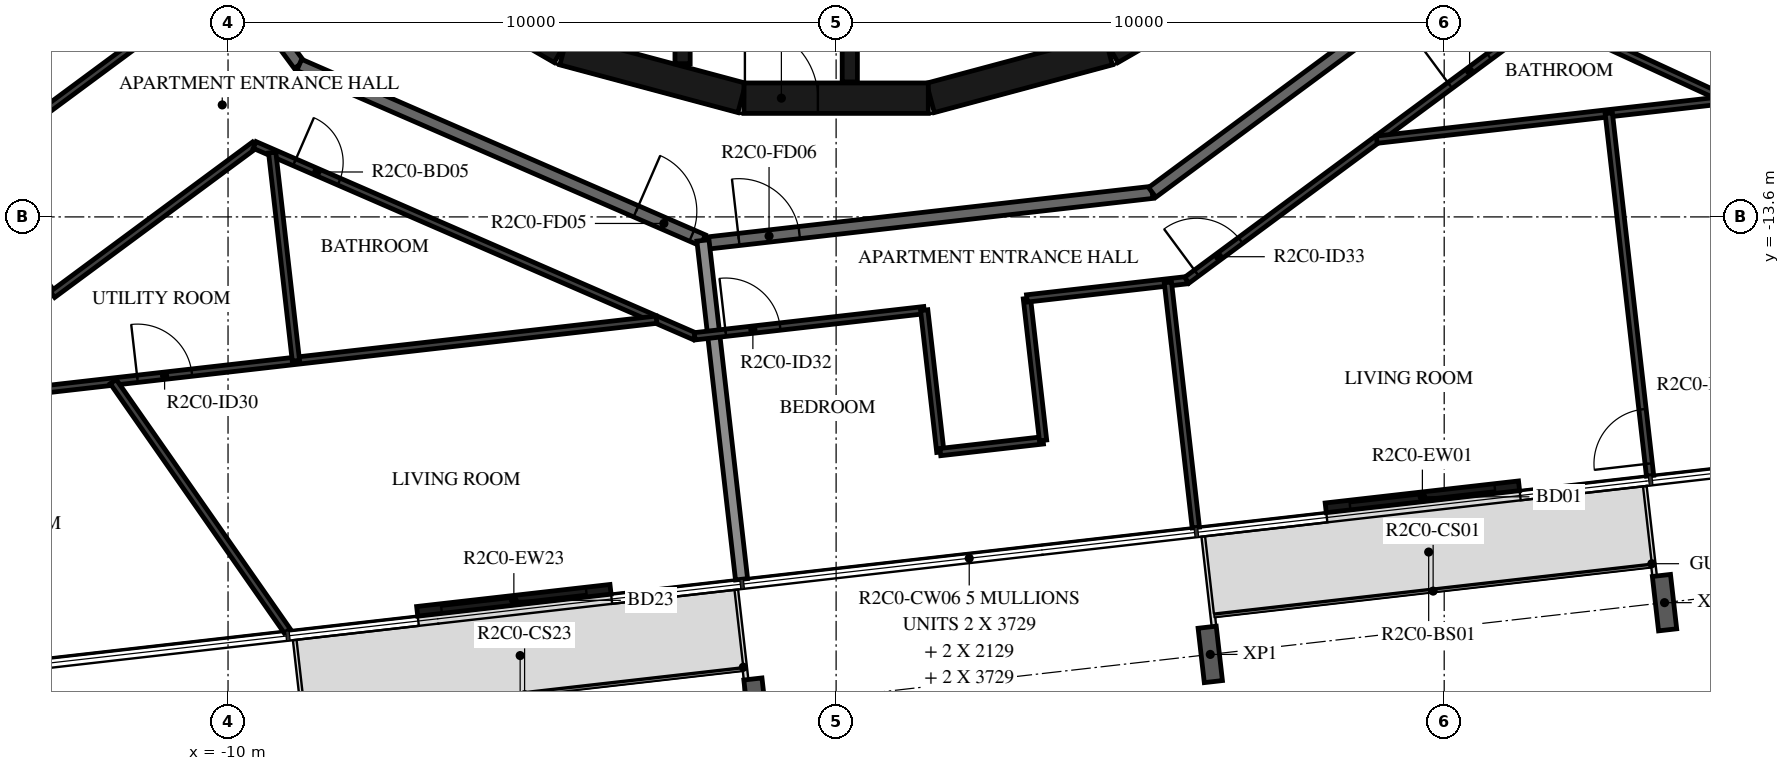
"""IFC4 building model, lengths in metres.
Left out: names, types, materials, properties, quantities, classifications, styles, units other than length and angle.
Written with IfcOpenShell. Run it as: python <this file> out.ifc"""

import sys

from ifc_helpers import new_model, si_unit, direction, frame, frame_2d, origin, origin_2d, place, context, subcontext, project, spatial, rectangle, i_section, extrude, element, fill, save


model = new_model("IFC4")
c1 = context("Model", 3, precision=1e-05, world=origin(), true_north=direction((0.0, 1.0)))
c2 = subcontext(c1, "Body", "Model", "MODEL_VIEW")
j1 = project(units=[si_unit("LENGTHUNIT", "METRE"), si_unit("PLANEANGLEUNIT", "RADIAN")], contexts=[c1])
p1 = place(None, origin())
s1 = spatial("IfcSite", under=j1, at=p1, CompositionType="ELEMENT")
p2 = place(p1, origin())
s2 = spatial("IfcBuilding", under=s1, at=p2, CompositionType="ELEMENT")
p3 = place(p2, frame((0.0, 0.0, 97.7)))
s3 = spatial("IfcBuildingStorey", under=s2, at=p3, CompositionType="ELEMENT", Elevation=97.7)
for number, where, z_axis, x_axis in (
    (1, (6.153, -20.795, -0.38), (0.0, 0.0, 1.0), (-0.994, -0.113, 0.0)),
    (2, (13.624, -19.944, -0.38), (0.0, 0.0, 1.0), (-0.994, -0.113, 0.0)),
    (3, (-1.317, -21.646, -0.38), (0.0, 0.0, 1.0), (-0.994, -0.113, 0.0)),
):
    element("IfcColumn", number, at=place(p3, frame(where, z_axis=z_axis, x_axis=x_axis)), inside=s3, PredefinedType="COLUMN", context=c2, shape_type="SweptSolid", body=[
        extrude(i_section(OverallWidth=0.3, OverallDepth=0.9, WebThickness=0.019, FlangeThickness=0.035, FilletRadius=0.03, at=origin_2d()), origin(), (0.0, 0.0, 1.0), 3.5),
    ])
p4 = place(p3, frame((-6.889, -20.086, 0.0), z_axis=(0.0, 0.0, 1.0), x_axis=(0.993578576686, 0.113144208648, 0.0)))
e4 = element("IfcWall", 4, at=p4, inside=s3, PredefinedType="STANDARD", context=c2, shape_type="SweptSolid", body=[
    extrude(rectangle(XDim=3.2, YDim=0.16, at=frame_2d((1.6, 0.0))), origin(), (0.0, 0.0, 1.0), 3.12),
])
p5 = place(p4, frame((0.4, 0.0, 0.0)))
e5 = element("IfcOpeningElement", 5, at=p5, cuts=e4, PredefinedType="OPENING", context=c2, shape_type="SweptSolid", body=[
    extrude(rectangle(XDim=2.4, YDim=2.4, at=frame_2d((1.2, 1.2))), frame((0.0, 0.09, 0.0), z_axis=(0.0, -1.0, 0.0), x_axis=(1.0, 0.0, 0.0)), (0.0, 0.0, 1.0), 0.18),
])
p6 = place(p3, frame((8.052, -18.384, 0.0), z_axis=(0.0, 0.0, 1.0), x_axis=(0.993569997097, 0.113219525124, 0.0)))
e6 = element("IfcWall", 6, at=p6, inside=s3, PredefinedType="STANDARD", context=c2, shape_type="SweptSolid", body=[
    extrude(rectangle(XDim=3.2, YDim=0.16, at=frame_2d((1.6, 0.0))), origin(), (0.0, 0.0, 1.0), 3.12),
])
p7 = place(p6, frame((0.4, 0.0, 0.0)))
e7 = element("IfcOpeningElement", 7, at=p7, cuts=e6, PredefinedType="OPENING", context=c2, shape_type="SweptSolid", body=[
    extrude(rectangle(XDim=2.4, YDim=2.4, at=frame_2d((1.2, 1.2))), frame((0.0, 0.09, 0.0), z_axis=(0.0, -1.0, 0.0), x_axis=(1.0, 0.0, 0.0)), (0.0, 0.0, 1.0), 0.18),
])
p8 = place(p3, frame((1.55, -11.643, 0.0), z_axis=(0.0, 0.0, 1.0), x_axis=(0.965948410781, 0.258734743916, 0.0)))
e8 = element("IfcWall", 8, at=p8, inside=s3, PredefinedType="SHEAR", context=c2, shape_type="SweptSolid", body=[
    extrude(rectangle(XDim=3.033, YDim=0.5, at=frame_2d((1.516, 0.0))), origin(), (0.0, 0.0, 1.0), 3.12),
])
p9 = place(p3, frame((4.51, -10.845, 0.0), z_axis=(0.0, 0.0, 1.0), x_axis=(0.865975092491, 0.500087131594, 0.0)))
e9 = element("IfcWall", 9, at=p9, inside=s3, PredefinedType="SHEAR", context=c2, shape_type="SweptSolid", body=[
    extrude(rectangle(XDim=3.033, YDim=0.5, at=frame_2d((1.516, 0.0))), origin(), (0.0, 0.0, 1.0), 3.12),
])
p10 = place(p9, frame((1.066, 0.0, 0.0)))
e10 = element("IfcOpeningElement", 10, at=p10, cuts=e9, PredefinedType="OPENING", context=c2, shape_type="SweptSolid", body=[
    extrude(rectangle(XDim=0.9, YDim=2.1, at=frame_2d((0.45, 1.05))), frame((0.0, 0.26, 0.0), z_axis=(0.0, -1.0, 0.0), x_axis=(1.0, 0.0, 0.0)), (0.0, 0.0, 1.0), 0.52),
])
for number, where, z_axis, x_axis in (
    (11, (-7.137, -9.329, 0.0), (0.0, 0.0, 1.0), (0.866, -0.5, 0.0)),
    (12, (-4.479, -10.858, 0.0), (0.0, 0.0, 1.0), (0.966, -0.259, 0.0)),
):
    element("IfcWall", number, at=place(p3, frame(where, z_axis=z_axis, x_axis=x_axis)), inside=s3, PredefinedType="SHEAR", context=c2, shape_type="SweptSolid", body=[
        extrude(rectangle(XDim=3.033, YDim=0.5, at=frame_2d((1.516, 0.0))), origin(), (0.0, 0.0, 1.0), 3.12),
    ])
p11 = place(p3, frame((-1.516, -11.647, 0.0), z_axis=(0.0, 0.0, 1.0), x_axis=(1.0, 0.0, 0.0)))
e13 = element("IfcWall", 13, at=p11, inside=s3, PredefinedType="SHEAR", context=c2, shape_type="SweptSolid", body=[
    extrude(rectangle(XDim=3.033, YDim=0.5, at=frame_2d((1.516, 0.0))), origin(), (0.0, 0.0, 1.0), 3.12),
])
p12 = place(p11, frame((0.016, 0.0, 0.0)))
e14 = element("IfcOpeningElement", 14, at=p12, cuts=e13, PredefinedType="OPENING", context=c2, shape_type="SweptSolid", body=[
    extrude(rectangle(XDim=1.2, YDim=2.1, at=frame_2d((0.6, 1.05))), frame((0.0, 0.26, 0.0), z_axis=(0.0, -1.0, 0.0), x_axis=(1.0, 0.0, 0.0)), (0.0, 0.0, 1.0), 0.52),
])
p13 = place(p3, frame((-2.525, -8.97, 0.0), z_axis=(0.0, 0.0, 1.0), x_axis=(0.0, -1.0, 0.0)))
e15 = element("IfcWall", 15, at=p13, inside=s3, PredefinedType="SHEAR", context=c2, shape_type="SweptSolid", body=[
    extrude(rectangle(XDim=2.11, YDim=0.25, at=frame_2d((1.055, 0.0))), origin(), (0.0, 0.0, 1.0), 3.12),
])
p14 = place(p3, frame((0.225, -8.97, 0.0), z_axis=(0.0, 0.0, 1.0), x_axis=(0.0, -1.0, 0.0)))
e16 = element("IfcWall", 16, at=p14, inside=s3, PredefinedType="SHEAR", context=c2, shape_type="SweptSolid", body=[
    extrude(rectangle(XDim=2.41, YDim=0.25, at=frame_2d((1.205, 0.0))), origin(), (0.0, 0.0, 1.0), 3.12),
])
p15 = place(p3, frame((-13.196, -5.198, 0.0), z_axis=(0.0, 0.0, 1.0), x_axis=(0.594805187394, -0.803869883159, 0.0)))
e17 = element("IfcWall", 17, at=p15, inside=s3, PredefinedType="STANDARD", context=c2, shape_type="SweptSolid", body=[
    extrude(rectangle(XDim=7.342, YDim=0.2, at=frame_2d((3.671, 0.0))), origin(), (0.0, 0.0, 1.0), 3.12),
])
p16 = place(p3, frame((-8.829, -11.1, 0.0), z_axis=(0.0, 0.0, 1.0), x_axis=(0.917063622491, -0.398740908742, 0.0)))
e18 = element("IfcWall", 18, at=p16, inside=s3, PredefinedType="STANDARD", context=c2, shape_type="SweptSolid", body=[
    extrude(rectangle(XDim=7.24, YDim=0.2, at=frame_2d((3.62, 0.0))), origin(), (0.0, 0.0, 1.0), 3.12),
])
p17 = place(p16, frame((6.04, 0.0, 0.0)))
e19 = element("IfcOpeningElement", 19, at=p17, cuts=e18, PredefinedType="OPENING", context=c2, shape_type="SweptSolid", body=[
    extrude(rectangle(XDim=1.0, YDim=2.1, at=frame_2d((0.5, 1.05))), frame((0.0, 0.11, 0.0), z_axis=(0.0, -1.0, 0.0), x_axis=(1.0, 0.0, 0.0)), (0.0, 0.0, 1.0), 0.22),
])
p18 = place(p3, frame((-2.096, -14.028, 0.0), z_axis=(0.0, 0.0, 1.0), x_axis=(0.993569170114, 0.113226782163, 0.0)))
e20 = element("IfcWall", 20, at=p18, inside=s3, PredefinedType="STANDARD", context=c2, shape_type="SweptSolid", body=[
    extrude(rectangle(XDim=7.342, YDim=0.2, at=frame_2d((3.671, 0.0))), origin(), (0.0, 0.0, 1.0), 3.12),
])
p19 = place(p18, frame((0.5, 0.0, 0.0)))
e21 = element("IfcOpeningElement", 21, at=p19, cuts=e20, PredefinedType="OPENING", context=c2, shape_type="SweptSolid", body=[
    extrude(rectangle(XDim=1.0, YDim=2.1, at=frame_2d((0.5, 1.05))), frame((0.0, 0.11, 0.0), z_axis=(0.0, -1.0, 0.0), x_axis=(1.0, 0.0, 0.0)), (0.0, 0.0, 1.0), 0.22),
])
p20 = place(p3, frame((5.198, -13.196, 0.0), z_axis=(0.0, 0.0, 1.0), x_axis=(0.803869883159, 0.594805187394, 0.0)))
e22 = element("IfcWall", 22, at=p20, inside=s3, PredefinedType="STANDARD", context=c2, shape_type="SweptSolid", body=[
    extrude(rectangle(XDim=7.342, YDim=0.2, at=frame_2d((3.671, 0.0))), origin(), (0.0, 0.0, 1.0), 3.12),
])
p21 = place(p3, frame((-16.649, -12.32, 0.0), z_axis=(0.0, 0.0, 1.0), x_axis=(0.803869204071, 0.594806105169, 0.0)))
e23 = element("IfcWall", 23, at=p21, inside=s3, PredefinedType="STANDARD", context=c2, shape_type="SweptSolid", body=[
    extrude(rectangle(XDim=7.011, YDim=0.2, at=frame_2d((3.506, 0.0))), origin(), (0.0, 0.0, 1.0), 3.12),
])
p22 = place(p3, frame((-1.555, -19.559, 0.0), z_axis=(0.0, 0.0, 1.0), x_axis=(-0.113221250863, 0.993569800443, 0.0)))
e24 = element("IfcWall", 24, at=p22, inside=s3, PredefinedType="STANDARD", context=c2, shape_type="SweptSolid", body=[
    extrude(rectangle(XDim=5.609, YDim=0.2, at=frame_2d((2.804, 0.0))), origin(), (0.0, 0.0, 1.0), 2.73),
])
p23 = place(p3, frame((-11.152, -10.483, 0.0), z_axis=(0.0, 0.0, 1.0), x_axis=(-0.803843064298, -0.594841430954, 0.0)))
e25 = element("IfcWall", 25, at=p23, inside=s3, PredefinedType="PARTITIONING", context=c2, shape_type="SweptSolid", body=[
    extrude(rectangle(XDim=4.008, YDim=0.12, at=frame_2d((2.004, 0.0))), origin(), (0.0, 0.0, 1.0), 3.12),
])
p24 = place(p3, frame((-14.374, -12.867, 0.0), z_axis=(0.0, 0.0, 1.0), x_axis=(0.594800097121, -0.803873649565, 0.0)))
e26 = element("IfcWall", 26, at=p24, inside=s3, PredefinedType="PARTITIONING", context=c2, shape_type="SweptSolid", body=[
    extrude(rectangle(XDim=2.5, YDim=0.12, at=frame_2d((1.25, 0.0))), origin(), (0.0, 0.0, 1.0), 3.12),
])
p25 = place(p3, frame((-12.886, -14.877, 0.0), z_axis=(0.0, 0.0, 1.0), x_axis=(0.803816491389, 0.594877338761, 0.0)))
e27 = element("IfcWall", 27, at=p25, inside=s3, PredefinedType="PARTITIONING", context=c2, shape_type="SweptSolid", body=[
    extrude(rectangle(XDim=4.135, YDim=0.12, at=frame_2d((2.068, 0.0))), origin(), (0.0, 0.0, 1.0), 3.12),
])
p26 = place(p3, frame((-9.562, -12.417, 0.0), z_axis=(0.0, 0.0, 1.0), x_axis=(0.917063169851, -0.398741949767, 0.0)))
e28 = element("IfcWall", 28, at=p26, inside=s3, PredefinedType="PARTITIONING", context=c2, shape_type="SweptSolid", body=[
    extrude(rectangle(XDim=7.891, YDim=0.12, at=frame_2d((3.946, 0.0))), origin(), (0.0, 0.0, 1.0), 3.12),
])
p27 = place(p26, frame((0.715, 0.0, 0.0)))
e29 = element("IfcOpeningElement", 29, at=p27, cuts=e28, PredefinedType="OPENING", context=c2, shape_type="SweptSolid", body=[
    extrude(rectangle(XDim=0.8, YDim=2.1, at=frame_2d((0.4, 1.05))), frame((0.0, 0.07, 0.0), z_axis=(0.0, -1.0, 0.0), x_axis=(1.0, 0.0, 0.0)), (0.0, 0.0, 1.0), 0.14),
])
p28 = place(p3, frame((-2.326, -15.563, 0.0), z_axis=(0.0, 0.0, 1.0), x_axis=(0.993575068384, 0.113175012641, 0.0)))
e30 = element("IfcWall", 30, at=p28, inside=s3, PredefinedType="PARTITIONING", context=c2, shape_type="SweptSolid", body=[
    extrude(rectangle(XDim=3.799, YDim=0.12, at=frame_2d((1.899, 0.0))), origin(), (0.0, 0.0, 1.0), 3.12),
])
p29 = place(p28, frame((0.513, 0.0, 0.0)))
e31 = element("IfcOpeningElement", 31, at=p29, cuts=e30, PredefinedType="OPENING", context=c2, shape_type="SweptSolid", body=[
    extrude(rectangle(XDim=0.9, YDim=2.1, at=frame_2d((0.45, 1.05))), frame((0.0, 0.07, 0.0), z_axis=(0.0, -1.0, 0.0), x_axis=(1.0, 0.0, 0.0)), (0.0, 0.0, 1.0), 0.14),
])
p30 = place(p3, frame((-17.437, -16.94, 0.0), z_axis=(0.0, 0.0, 1.0), x_axis=(0.993573314119, 0.113190412448, 0.0)))
e32 = element("IfcWall", 32, at=p30, inside=s3, PredefinedType="PARTITIONING", context=c2, shape_type="SweptSolid", body=[
    extrude(rectangle(XDim=14.576, YDim=0.12, at=frame_2d((7.288, 0.0))), origin(), (0.0, 0.0, 1.0), 3.12),
])
p31 = place(p30, frame((3.201, 0.0, 0.0)))
e33 = element("IfcOpeningElement", 33, at=p31, cuts=e32, PredefinedType="OPENING", context=c2, shape_type="SweptSolid", body=[
    extrude(rectangle(XDim=0.9, YDim=2.1, at=frame_2d((0.45, 1.05))), frame((0.0, 0.07, 0.0), z_axis=(0.0, -1.0, 0.0), x_axis=(1.0, 0.0, 0.0)), (0.0, 0.0, 1.0), 0.14),
])
p32 = place(p30, frame((5.985, 0.0, 0.0)))
e34 = element("IfcOpeningElement", 34, at=p32, cuts=e32, PredefinedType="OPENING", context=c2, shape_type="SweptSolid", body=[
    extrude(rectangle(XDim=0.9, YDim=2.1, at=frame_2d((0.45, 1.05))), frame((0.0, 0.07, 0.0), z_axis=(0.0, -1.0, 0.0), x_axis=(1.0, 0.0, 0.0)), (0.0, 0.0, 1.0), 0.14),
])
p33 = place(p3, frame((-8.884, -15.966, 0.0), z_axis=(0.0, 0.0, 1.0), x_axis=(-0.113230836929, 0.993568708026, 0.0)))
e35 = element("IfcWall", 35, at=p33, inside=s3, PredefinedType="PARTITIONING", context=c2, shape_type="SweptSolid", body=[
    extrude(rectangle(XDim=3.446, YDim=0.12, at=frame_2d((1.723, 0.0))), origin(), (0.0, 0.0, 1.0), 3.12),
])
p34 = place(p3, frame((-9.026, -20.41, 0.0), z_axis=(0.0, 0.0, 1.0), x_axis=(-0.57218083256, 0.82012748695, 0.0)))
e36 = element("IfcWall", 36, at=p34, inside=s3, PredefinedType="PARTITIONING", context=c2, shape_type="SweptSolid", body=[
    extrude(rectangle(XDim=5.002, YDim=0.12, at=frame_2d((2.501, 0.0))), origin(), (0.0, 0.0, 1.0), 3.12),
])
p35 = place(p3, frame((1.448, -15.133, 0.0), z_axis=(0.0, 0.0, 1.0), x_axis=(0.113180189053, -0.993574478741, 0.0)))
e37 = element("IfcWall", 37, at=p35, inside=s3, PredefinedType="PARTITIONING", context=c2, shape_type="SweptSolid", body=[
    extrude(rectangle(XDim=2.349, YDim=0.12, at=frame_2d((1.175, 0.0))), origin(), (0.0, 0.0, 1.0), 3.12),
])
p36 = place(p3, frame((1.714, -17.467, 0.0), z_axis=(0.0, 0.0, 1.0), x_axis=(0.993577030812, 0.113157782957, 0.0)))
e38 = element("IfcWall", 38, at=p36, inside=s3, PredefinedType="PARTITIONING", context=c2, shape_type="SweptSolid", body=[
    extrude(rectangle(XDim=1.7, YDim=0.12, at=frame_2d((0.85, 0.0))), origin(), (0.0, 0.0, 1.0), 3.12),
])
p37 = place(p3, frame((3.404, -17.275, 0.0), z_axis=(0.0, 0.0, 1.0), x_axis=(-0.113180189053, 0.993574478741, 0.0)))
e39 = element("IfcWall", 39, at=p37, inside=s3, PredefinedType="PARTITIONING", context=c2, shape_type="SweptSolid", body=[
    extrude(rectangle(XDim=2.349, YDim=0.12, at=frame_2d((1.175, 0.0))), origin(), (0.0, 0.0, 1.0), 3.12),
])
p38 = place(p3, frame((3.138, -14.941, 0.0), z_axis=(0.0, 0.0, 1.0), x_axis=(0.99356355736, 0.113276023437, 0.0)))
e40 = element("IfcWall", 40, at=p38, inside=s3, PredefinedType="PARTITIONING", context=c2, shape_type="SweptSolid", body=[
    extrude(rectangle(XDim=2.647, YDim=0.12, at=frame_2d((1.323, 0.0))), origin(), (0.0, 0.0, 1.0), 3.12),
])
p39 = place(p3, frame((5.767, -14.641, 0.0), z_axis=(0.0, 0.0, 1.0), x_axis=(0.803867427863, 0.594808505673, 0.0)))
e41 = element("IfcWall", 41, at=p39, inside=s3, PredefinedType="PARTITIONING", context=c2, shape_type="SweptSolid", body=[
    extrude(rectangle(XDim=7.316, YDim=0.12, at=frame_2d((3.658, 0.0))), origin(), (0.0, 0.0, 1.0), 3.12),
])
p40 = place(p39, frame((0.2, 0.0, 0.0)))
e42 = element("IfcOpeningElement", 42, at=p40, cuts=e41, PredefinedType="OPENING", context=c2, shape_type="SweptSolid", body=[
    extrude(rectangle(XDim=0.9, YDim=2.1, at=frame_2d((0.45, 1.05))), frame((0.0, 0.07, 0.0), z_axis=(0.0, -1.0, 0.0), x_axis=(1.0, 0.0, 0.0)), (0.0, 0.0, 1.0), 0.14),
])
p41 = place(p39, frame((5.385, 0.0, 0.0)))
e43 = element("IfcOpeningElement", 43, at=p41, cuts=e41, PredefinedType="OPENING", context=c2, shape_type="SweptSolid", body=[
    extrude(rectangle(XDim=0.8, YDim=2.1, at=frame_2d((0.4, 1.05))), frame((0.0, 0.07, 0.0), z_axis=(0.0, -1.0, 0.0), x_axis=(1.0, 0.0, 0.0)), (0.0, 0.0, 1.0), 0.14),
])
p42 = place(p3, frame((11.649, -10.289, 0.0), z_axis=(0.0, 0.0, 1.0), x_axis=(0.9079269461, -0.419128453514, 0.0)))
e44 = element("IfcWall", 44, at=p42, inside=s3, PredefinedType="PARTITIONING", context=c2, shape_type="SweptSolid", body=[
    extrude(rectangle(XDim=3.304, YDim=0.12, at=frame_2d((1.652, 0.0))), origin(), (0.0, 0.0, 1.0), 3.12),
])
p43 = place(p3, frame((5.915, -18.708, 0.0), z_axis=(0.0, 0.0, 1.0), x_axis=(-0.113244511591, 0.993567149515, 0.0)))
e45 = element("IfcWall", 45, at=p43, inside=s3, PredefinedType="PARTITIONING", context=c2, shape_type="SweptSolid", body=[
    extrude(rectangle(XDim=4.057, YDim=0.12, at=frame_2d((2.029, 0.0))), origin(), (0.0, 0.0, 1.0), 2.73),
])
p44 = place(p3, frame((14.649, -11.674, 0.0), z_axis=(0.0, 0.0, 1.0), x_axis=(-0.993573746873, -0.113186613721, 0.0)))
e46 = element("IfcWall", 46, at=p44, inside=s3, PredefinedType="PARTITIONING", context=c2, shape_type="SweptSolid", body=[
    extrude(rectangle(XDim=5.796, YDim=0.12, at=frame_2d((2.898, 0.0))), origin(), (0.0, 0.0, 1.0), 3.12),
])
p45 = place(p3, frame((13.386, -17.857, 0.0), z_axis=(0.0, 0.0, 1.0), x_axis=(-0.113200012983, 0.993572220355, 0.0)))
e47 = element("IfcWall", 47, at=p45, inside=s3, PredefinedType="PARTITIONING", context=c2, shape_type="SweptSolid", body=[
    extrude(rectangle(XDim=6.0, YDim=0.12, at=frame_2d((3.0, 0.0))), origin(), (0.0, 0.0, 1.0), 2.73),
])
p46 = place(p45, frame((0.2, 0.0, 0.0)))
e48 = element("IfcOpeningElement", 48, at=p46, cuts=e47, PredefinedType="OPENING", context=c2, shape_type="SweptSolid", body=[
    extrude(rectangle(XDim=0.9, YDim=2.1, at=frame_2d((0.45, 1.05))), frame((0.0, 0.07, 0.0), z_axis=(0.0, -1.0, 0.0), x_axis=(1.0, 0.0, 0.0)), (0.0, 0.0, 1.0), 0.14),
])
p47 = place(p5, origin())
e49 = element("IfcDoor", 49, at=p47, inside=s3, OperationType="DOUBLE_DOOR_SLIDING", PredefinedType="DOOR", context=c2, shape_type="SweptSolid", body=[
    extrude(rectangle(XDim=2.4, YDim=2.4, at=frame_2d((1.2, 1.2))), frame((0.0, 0.025, 0.0), z_axis=(0.0, -1.0, 0.0), x_axis=(1.0, 0.0, 0.0)), (0.0, 0.0, 1.0), 0.05),
])
fill(e5, e49)
p48 = place(p7, origin())
e50 = element("IfcDoor", 50, at=p48, inside=s3, OperationType="DOUBLE_DOOR_SLIDING", PredefinedType="DOOR", context=c2, shape_type="SweptSolid", body=[
    extrude(rectangle(XDim=2.4, YDim=2.4, at=frame_2d((1.2, 1.2))), frame((0.0, 0.025, 0.0), z_axis=(0.0, -1.0, 0.0), x_axis=(1.0, 0.0, 0.0)), (0.0, 0.0, 1.0), 0.05),
])
fill(e7, e50)
p49 = place(p12, origin())
e51 = element("IfcDoor", 51, at=p49, inside=s3, OperationType="SINGLE_SWING_RIGHT", PredefinedType="DOOR", context=c2, shape_type="SweptSolid", body=[
    extrude(rectangle(XDim=1.2, YDim=2.1, at=frame_2d((0.6, 1.05))), frame((0.0, 0.025, 0.0), z_axis=(0.0, -1.0, 0.0), x_axis=(1.0, 0.0, 0.0)), (0.0, 0.0, 1.0), 0.05),
])
fill(e14, e51)
p50 = place(p17, origin())
e52 = element("IfcDoor", 52, at=p50, inside=s3, OperationType="SINGLE_SWING_LEFT", PredefinedType="DOOR", context=c2, shape_type="SweptSolid", body=[
    extrude(rectangle(XDim=1.0, YDim=2.1, at=frame_2d((0.5, 1.05))), frame((0.0, 0.025, 0.0), z_axis=(0.0, -1.0, 0.0), x_axis=(1.0, 0.0, 0.0)), (0.0, 0.0, 1.0), 0.05),
])
fill(e19, e52)
p51 = place(p27, origin())
e53 = element("IfcDoor", 53, at=p51, inside=s3, OperationType="SINGLE_SWING_LEFT", PredefinedType="DOOR", context=c2, shape_type="SweptSolid", body=[
    extrude(rectangle(XDim=0.8, YDim=2.1, at=frame_2d((0.4, 1.05))), frame((0.0, 0.025, 0.0), z_axis=(0.0, -1.0, 0.0), x_axis=(1.0, 0.0, 0.0)), (0.0, 0.0, 1.0), 0.05),
])
fill(e29, e53)
p52 = place(p32, origin())
e54 = element("IfcDoor", 54, at=p52, inside=s3, OperationType="SINGLE_SWING_LEFT", PredefinedType="DOOR", context=c2, shape_type="SweptSolid", body=[
    extrude(rectangle(XDim=0.9, YDim=2.1, at=frame_2d((0.45, 1.05))), frame((0.0, 0.025, 0.0), z_axis=(0.0, -1.0, 0.0), x_axis=(1.0, 0.0, 0.0)), (0.0, 0.0, 1.0), 0.05),
])
fill(e34, e54)
p53 = place(p19, origin())
e55 = element("IfcDoor", 55, at=p53, inside=s3, OperationType="SINGLE_SWING_LEFT", PredefinedType="DOOR", context=c2, shape_type="SweptSolid", body=[
    extrude(rectangle(XDim=1.0, YDim=2.1, at=frame_2d((0.5, 1.05))), frame((0.0, 0.025, 0.0), z_axis=(0.0, -1.0, 0.0), x_axis=(1.0, 0.0, 0.0)), (0.0, 0.0, 1.0), 0.05),
])
fill(e21, e55)
p54 = place(p29, origin())
e56 = element("IfcDoor", 56, at=p54, inside=s3, OperationType="SINGLE_SWING_LEFT", PredefinedType="DOOR", context=c2, shape_type="SweptSolid", body=[
    extrude(rectangle(XDim=0.9, YDim=2.1, at=frame_2d((0.45, 1.05))), frame((0.0, 0.025, 0.0), z_axis=(0.0, -1.0, 0.0), x_axis=(1.0, 0.0, 0.0)), (0.0, 0.0, 1.0), 0.05),
])
fill(e31, e56)
p55 = place(p40, origin())
e57 = element("IfcDoor", 57, at=p55, inside=s3, OperationType="SINGLE_SWING_RIGHT", PredefinedType="DOOR", context=c2, shape_type="SweptSolid", body=[
    extrude(rectangle(XDim=0.9, YDim=2.1, at=frame_2d((0.45, 1.05))), frame((0.0, 0.025, 0.0), z_axis=(0.0, -1.0, 0.0), x_axis=(1.0, 0.0, 0.0)), (0.0, 0.0, 1.0), 0.05),
])
fill(e42, e57)
p56 = place(p41, origin())
e58 = element("IfcDoor", 58, at=p56, inside=s3, OperationType="SINGLE_SWING_RIGHT", PredefinedType="DOOR", context=c2, shape_type="SweptSolid", body=[
    extrude(rectangle(XDim=0.8, YDim=2.1, at=frame_2d((0.4, 1.05))), frame((0.0, 0.025, 0.0), z_axis=(0.0, -1.0, 0.0), x_axis=(1.0, 0.0, 0.0)), (0.0, 0.0, 1.0), 0.05),
])
fill(e43, e58)
p57 = place(p46, origin())
e59 = element("IfcDoor", 59, at=p57, inside=s3, OperationType="SINGLE_SWING_RIGHT", PredefinedType="DOOR", context=c2, shape_type="SweptSolid", body=[
    extrude(rectangle(XDim=0.9, YDim=2.1, at=frame_2d((0.45, 1.05))), frame((0.0, 0.025, 0.0), z_axis=(0.0, -1.0, 0.0), x_axis=(1.0, 0.0, 0.0)), (0.0, 0.0, 1.0), 0.05),
])
fill(e48, e59)
save(model, sys.argv[1])
